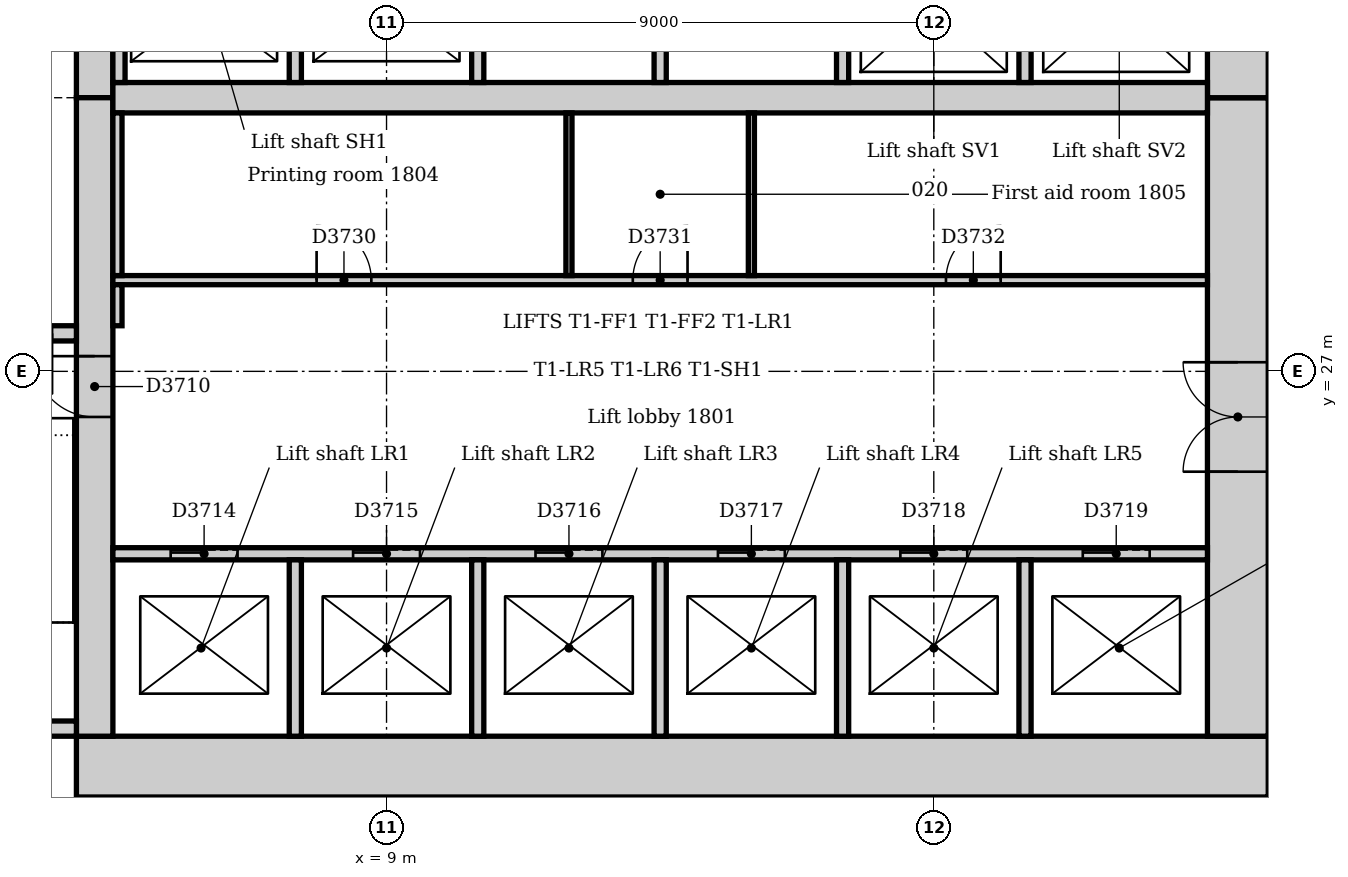
"""IFC4 building model, lengths in metres.
Left out: names, types, materials, properties, quantities, classifications, styles, units other than length and angle.
Written with IfcOpenShell. Run it as: python <this file> out.ifc"""

import sys

from ifc_helpers import new_model, si_unit, direction, frame, frame_2d, origin, place, context, subcontext, project, spatial, rectangle, extrude, element, fill, save


model = new_model("IFC4")
c1 = context("Model", 3, precision=1e-05, world=origin(), true_north=direction((0.0, 1.0)))
c2 = subcontext(c1, "Body", "Model", "MODEL_VIEW")
j1 = project(units=[si_unit("LENGTHUNIT", "METRE"), si_unit("PLANEANGLEUNIT", "RADIAN")], contexts=[c1])
p1 = place(None, origin())
s1 = spatial("IfcSite", under=j1, at=p1, CompositionType="ELEMENT")
p2 = place(p1, origin())
s2 = spatial("IfcBuilding", under=s1, at=p2, CompositionType="ELEMENT")
p3 = place(p2, frame((0.0, 0.0, 79.0)))
s3 = spatial("IfcBuildingStorey", under=s2, at=p3, CompositionType="ELEMENT", Elevation=79.0)
p4 = place(p3, frame((3.9, 20.5, 0.0), z_axis=(0.0, 0.0, 1.0), x_axis=(1.0, 0.0, 0.0)))
e1 = element("IfcWall", 1, at=p4, inside=s3, PredefinedType="SOLIDWALL", context=c2, shape_type="SweptSolid", body=[
    extrude(rectangle(XDim=19.6, YDim=1.0, at=frame_2d((9.8, 0.0))), origin(), (0.0, 0.0, 1.0), 4.0),
])
p5 = place(p3, frame((23.0, 21.0, 0.0), z_axis=(0.0, 0.0, 1.0), x_axis=(0.0, 1.0, 0.0)))
e2 = element("IfcWall", 2, at=p5, inside=s3, PredefinedType="SOLIDWALL", context=c2, shape_type="SweptSolid", body=[
    extrude(rectangle(XDim=10.5, YDim=1.0, at=frame_2d((5.25, 0.0))), origin(), (0.0, 0.0, 1.0), 4.0),
])
p6 = place(p5, frame((4.35, 0.0, 0.0)))
e3 = element("IfcOpeningElement", 3, at=p6, cuts=e2, PredefinedType="OPENING", context=c2, shape_type="SweptSolid", body=[
    extrude(rectangle(XDim=1.8, YDim=2.1, at=frame_2d((0.9, 1.05))), frame((0.0, 0.51, 0.0), z_axis=(0.0, -1.0, 0.0), x_axis=(1.0, 0.0, 0.0)), (0.0, 0.0, 1.0), 1.02),
])
p7 = place(p3, frame((23.0, 31.5, 0.0), z_axis=(0.0, 0.0, 1.0), x_axis=(0.0, 1.0, 0.0)))
e4 = element("IfcWall", 4, at=p7, inside=s3, PredefinedType="SOLIDWALL", context=c2, shape_type="SweptSolid", body=[
    extrude(rectangle(XDim=10.5, YDim=1.0, at=frame_2d((5.25, 0.0))), origin(), (0.0, 0.0, 1.0), 4.0),
])
p8 = place(p7, frame((3.15, 0.0, 0.0)))
e5 = element("IfcOpeningElement", 5, at=p8, cuts=e4, PredefinedType="OPENING", context=c2, shape_type="SweptSolid", body=[
    extrude(rectangle(XDim=1.0, YDim=2.1, at=frame_2d((0.5, 1.05))), frame((0.0, 0.51, 0.0), z_axis=(0.0, -1.0, 0.0), x_axis=(1.0, 0.0, 0.0)), (0.0, 0.0, 1.0), 1.02),
])
p9 = place(p7, frame((5.2, 0.0, 0.0)))
e6 = element("IfcOpeningElement", 6, at=p9, cuts=e4, PredefinedType="OPENING", context=c2, shape_type="SweptSolid", body=[
    extrude(rectangle(XDim=1.0, YDim=2.1, at=frame_2d((0.5, 1.05))), frame((0.0, 0.51, 0.0), z_axis=(0.0, -1.0, 0.0), x_axis=(1.0, 0.0, 0.0)), (0.0, 0.0, 1.0), 1.02),
])
p10 = place(p3, frame((4.2, 42.0, 0.0), z_axis=(0.0, 0.0, 1.0), x_axis=(0.0, -1.0, 0.0)))
e7 = element("IfcWall", 7, at=p10, inside=s3, PredefinedType="SOLIDWALL", context=c2, shape_type="SweptSolid", body=[
    extrude(rectangle(XDim=10.5, YDim=0.6, at=frame_2d((5.25, 0.0))), origin(), (0.0, 0.0, 1.0), 4.0),
])
p11 = place(p10, frame((5.3, 0.0, 0.0)))
e8 = element("IfcOpeningElement", 8, at=p11, cuts=e7, PredefinedType="OPENING", context=c2, shape_type="SweptSolid", body=[
    extrude(rectangle(XDim=1.0, YDim=2.1, at=frame_2d((0.5, 1.05))), frame((0.0, 0.31, 0.0), z_axis=(0.0, -1.0, 0.0), x_axis=(1.0, 0.0, 0.0)), (0.0, 0.0, 1.0), 0.62),
])
p12 = place(p3, frame((4.2, 31.5, 0.0), z_axis=(0.0, 0.0, 1.0), x_axis=(0.0, -1.0, 0.0)))
e9 = element("IfcWall", 9, at=p12, inside=s3, PredefinedType="SOLIDWALL", context=c2, shape_type="SweptSolid", body=[
    extrude(rectangle(XDim=10.5, YDim=0.6, at=frame_2d((5.25, 0.0))), origin(), (0.0, 0.0, 1.0), 4.0),
])
p13 = place(p12, frame((4.25, 0.0, 0.0)))
e10 = element("IfcOpeningElement", 10, at=p13, cuts=e9, PredefinedType="OPENING", context=c2, shape_type="SweptSolid", body=[
    extrude(rectangle(XDim=1.0, YDim=2.1, at=frame_2d((0.5, 1.05))), frame((0.0, 0.31, 0.0), z_axis=(0.0, -1.0, 0.0), x_axis=(1.0, 0.0, 0.0)), (0.0, 0.0, 1.0), 0.62),
])
p14 = place(p3, frame((4.5, 31.5, 0.0), z_axis=(0.0, 0.0, 1.0), x_axis=(1.0, 0.0, 0.0)))
e11 = element("IfcWall", 11, at=p14, inside=s3, PredefinedType="SOLIDWALL", context=c2, shape_type="SweptSolid", body=[
    extrude(rectangle(XDim=18.0, YDim=0.5, at=frame_2d((9.0, 0.0))), origin(), (0.0, 0.0, 1.0), 4.0),
])
p15 = place(p3, frame((0.36, 21.125, 0.0), z_axis=(0.0, 0.0, 1.0), x_axis=(1.0, 0.0, 0.0)))
e12 = element("IfcWall", 12, at=p15, inside=s3, PredefinedType="SOLIDWALL", context=c2, shape_type="SweptSolid", body=[
    extrude(rectangle(XDim=3.54, YDim=0.25, at=frame_2d((1.77, 0.0))), origin(), (0.0, 0.0, 1.0), 4.0),
])
p16 = place(p3, frame((3.9, 27.625, 0.0), z_axis=(0.0, 0.0, 1.0), x_axis=(-1.0, 0.0, 0.0)))
e13 = element("IfcWall", 13, at=p16, inside=s3, PredefinedType="SOLIDWALL", context=c2, shape_type="SweptSolid", body=[
    extrude(rectangle(XDim=3.54, YDim=0.25, at=frame_2d((1.77, 0.0))), origin(), (0.0, 0.0, 1.0), 4.0),
])
p17 = place(p16, frame((0.4, 0.0, 0.0)))
e14 = element("IfcOpeningElement", 14, at=p17, cuts=e13, PredefinedType="OPENING", context=c2, shape_type="SweptSolid", body=[
    extrude(rectangle(XDim=1.0, YDim=2.1, at=frame_2d((0.5, 1.05))), frame((0.0, 0.135, 0.0), z_axis=(0.0, -1.0, 0.0), x_axis=(1.0, 0.0, 0.0)), (0.0, 0.0, 1.0), 0.27),
])
p18 = place(p3, frame((4.5, 24.0, 0.0), z_axis=(0.0, 0.0, 1.0), x_axis=(1.0, 0.0, 0.0)))
e15 = element("IfcWall", 15, at=p18, inside=s3, PredefinedType="PARTITIONING", context=c2, shape_type="SweptSolid", body=[
    extrude(rectangle(XDim=18.0, YDim=0.2, at=frame_2d((9.0, 0.0))), origin(), (0.0, 0.0, 1.0), 3.85),
])
p19 = place(p18, frame((0.95, 0.0, 0.0)))
e16 = element("IfcOpeningElement", 16, at=p19, cuts=e15, PredefinedType="OPENING", context=c2, shape_type="SweptSolid", body=[
    extrude(rectangle(XDim=1.1, YDim=2.1, at=frame_2d((0.55, 1.05))), frame((0.0, 0.11, 0.0), z_axis=(0.0, -1.0, 0.0), x_axis=(1.0, 0.0, 0.0)), (0.0, 0.0, 1.0), 0.22),
])
p20 = place(p18, frame((3.95, 0.0, 0.0)))
e17 = element("IfcOpeningElement", 17, at=p20, cuts=e15, PredefinedType="OPENING", context=c2, shape_type="SweptSolid", body=[
    extrude(rectangle(XDim=1.1, YDim=2.1, at=frame_2d((0.55, 1.05))), frame((0.0, 0.11, 0.0), z_axis=(0.0, -1.0, 0.0), x_axis=(1.0, 0.0, 0.0)), (0.0, 0.0, 1.0), 0.22),
])
p21 = place(p18, frame((6.95, 0.0, 0.0)))
e18 = element("IfcOpeningElement", 18, at=p21, cuts=e15, PredefinedType="OPENING", context=c2, shape_type="SweptSolid", body=[
    extrude(rectangle(XDim=1.1, YDim=2.1, at=frame_2d((0.55, 1.05))), frame((0.0, 0.11, 0.0), z_axis=(0.0, -1.0, 0.0), x_axis=(1.0, 0.0, 0.0)), (0.0, 0.0, 1.0), 0.22),
])
p22 = place(p18, frame((9.95, 0.0, 0.0)))
e19 = element("IfcOpeningElement", 19, at=p22, cuts=e15, PredefinedType="OPENING", context=c2, shape_type="SweptSolid", body=[
    extrude(rectangle(XDim=1.1, YDim=2.1, at=frame_2d((0.55, 1.05))), frame((0.0, 0.11, 0.0), z_axis=(0.0, -1.0, 0.0), x_axis=(1.0, 0.0, 0.0)), (0.0, 0.0, 1.0), 0.22),
])
p23 = place(p18, frame((12.95, 0.0, 0.0)))
e20 = element("IfcOpeningElement", 20, at=p23, cuts=e15, PredefinedType="OPENING", context=c2, shape_type="SweptSolid", body=[
    extrude(rectangle(XDim=1.1, YDim=2.1, at=frame_2d((0.55, 1.05))), frame((0.0, 0.11, 0.0), z_axis=(0.0, -1.0, 0.0), x_axis=(1.0, 0.0, 0.0)), (0.0, 0.0, 1.0), 0.22),
])
p24 = place(p18, frame((15.95, 0.0, 0.0)))
e21 = element("IfcOpeningElement", 21, at=p24, cuts=e15, PredefinedType="OPENING", context=c2, shape_type="SweptSolid", body=[
    extrude(rectangle(XDim=1.1, YDim=2.1, at=frame_2d((0.55, 1.05))), frame((0.0, 0.11, 0.0), z_axis=(0.0, -1.0, 0.0), x_axis=(1.0, 0.0, 0.0)), (0.0, 0.0, 1.0), 0.22),
])
p25 = place(p3, frame((4.6, 31.75, 0.0), z_axis=(0.0, 0.0, 1.0), x_axis=(0.0, 1.0, 0.0)))
e22 = element("IfcWall", 22, at=p25, inside=s3, PredefinedType="PARTITIONING", context=c2, shape_type="SweptSolid", body=[
    extrude(rectangle(XDim=2.65, YDim=0.2, at=frame_2d((1.325, 0.0))), origin(), (0.0, 0.0, 1.0), 3.85),
])
p26 = place(p3, frame((7.5, 21.0, 0.0), z_axis=(0.0, 0.0, 1.0), x_axis=(0.0, 1.0, 0.0)))
e23 = element("IfcWall", 23, at=p26, inside=s3, PredefinedType="PARTITIONING", context=c2, shape_type="SweptSolid", body=[
    extrude(rectangle(XDim=2.9, YDim=0.2, at=frame_2d((1.45, 0.0))), origin(), (0.0, 0.0, 1.0), 3.85),
])
p27 = place(p3, frame((7.5, 31.75, 0.0), z_axis=(0.0, 0.0, 1.0), x_axis=(0.0, 1.0, 0.0)))
e24 = element("IfcWall", 24, at=p27, inside=s3, PredefinedType="PARTITIONING", context=c2, shape_type="SweptSolid", body=[
    extrude(rectangle(XDim=2.65, YDim=0.2, at=frame_2d((1.325, 0.0))), origin(), (0.0, 0.0, 1.0), 3.85),
])
p28 = place(p3, frame((10.5, 21.0, 0.0), z_axis=(0.0, 0.0, 1.0), x_axis=(0.0, 1.0, 0.0)))
e25 = element("IfcWall", 25, at=p28, inside=s3, PredefinedType="PARTITIONING", context=c2, shape_type="SweptSolid", body=[
    extrude(rectangle(XDim=2.9, YDim=0.2, at=frame_2d((1.45, 0.0))), origin(), (0.0, 0.0, 1.0), 3.85),
])
p29 = place(p3, frame((10.5, 31.75, 0.0), z_axis=(0.0, 0.0, 1.0), x_axis=(0.0, 1.0, 0.0)))
e26 = element("IfcWall", 26, at=p29, inside=s3, PredefinedType="PARTITIONING", context=c2, shape_type="SweptSolid", body=[
    extrude(rectangle(XDim=2.65, YDim=0.2, at=frame_2d((1.325, 0.0))), origin(), (0.0, 0.0, 1.0), 3.85),
])
p30 = place(p3, frame((13.5, 21.0, 0.0), z_axis=(0.0, 0.0, 1.0), x_axis=(0.0, 1.0, 0.0)))
e27 = element("IfcWall", 27, at=p30, inside=s3, PredefinedType="PARTITIONING", context=c2, shape_type="SweptSolid", body=[
    extrude(rectangle(XDim=2.9, YDim=0.2, at=frame_2d((1.45, 0.0))), origin(), (0.0, 0.0, 1.0), 3.85),
])
p31 = place(p3, frame((13.5, 31.75, 0.0), z_axis=(0.0, 0.0, 1.0), x_axis=(0.0, 1.0, 0.0)))
e28 = element("IfcWall", 28, at=p31, inside=s3, PredefinedType="PARTITIONING", context=c2, shape_type="SweptSolid", body=[
    extrude(rectangle(XDim=2.65, YDim=0.2, at=frame_2d((1.325, 0.0))), origin(), (0.0, 0.0, 1.0), 3.85),
])
p32 = place(p3, frame((16.5, 21.0, 0.0), z_axis=(0.0, 0.0, 1.0), x_axis=(0.0, 1.0, 0.0)))
e29 = element("IfcWall", 29, at=p32, inside=s3, PredefinedType="PARTITIONING", context=c2, shape_type="SweptSolid", body=[
    extrude(rectangle(XDim=2.9, YDim=0.2, at=frame_2d((1.45, 0.0))), origin(), (0.0, 0.0, 1.0), 3.85),
])
p33 = place(p3, frame((16.5, 31.75, 0.0), z_axis=(0.0, 0.0, 1.0), x_axis=(0.0, 1.0, 0.0)))
e30 = element("IfcWall", 30, at=p33, inside=s3, PredefinedType="PARTITIONING", context=c2, shape_type="SweptSolid", body=[
    extrude(rectangle(XDim=2.65, YDim=0.2, at=frame_2d((1.325, 0.0))), origin(), (0.0, 0.0, 1.0), 3.85),
])
p34 = place(p3, frame((19.5, 21.0, 0.0), z_axis=(0.0, 0.0, 1.0), x_axis=(0.0, 1.0, 0.0)))
e31 = element("IfcWall", 31, at=p34, inside=s3, PredefinedType="PARTITIONING", context=c2, shape_type="SweptSolid", body=[
    extrude(rectangle(XDim=2.9, YDim=0.2, at=frame_2d((1.45, 0.0))), origin(), (0.0, 0.0, 1.0), 3.85),
])
p35 = place(p3, frame((19.5, 31.75, 0.0), z_axis=(0.0, 0.0, 1.0), x_axis=(0.0, 1.0, 0.0)))
e32 = element("IfcWall", 32, at=p35, inside=s3, PredefinedType="PARTITIONING", context=c2, shape_type="SweptSolid", body=[
    extrude(rectangle(XDim=2.65, YDim=0.2, at=frame_2d((1.325, 0.0))), origin(), (0.0, 0.0, 1.0), 3.85),
])
p36 = place(p3, frame((4.5, 28.5, 0.0), z_axis=(0.0, 0.0, 1.0), x_axis=(1.0, 0.0, 0.0)))
e33 = element("IfcWall", 33, at=p36, inside=s3, PredefinedType="PARTITIONING", context=c2, shape_type="SweptSolid", body=[
    extrude(rectangle(XDim=18.0, YDim=0.15, at=frame_2d((9.0, 0.0))), origin(), (0.0, 0.0, 1.0), 3.85),
])
p37 = place(p36, frame((3.35, 0.0, 0.0)))
e34 = element("IfcOpeningElement", 34, at=p37, cuts=e33, PredefinedType="OPENING", context=c2, shape_type="SweptSolid", body=[
    extrude(rectangle(XDim=0.9, YDim=2.1, at=frame_2d((0.45, 1.05))), frame((0.0, 0.085, 0.0), z_axis=(0.0, -1.0, 0.0), x_axis=(1.0, 0.0, 0.0)), (0.0, 0.0, 1.0), 0.17),
])
p38 = place(p36, frame((8.55, 0.0, 0.0)))
e35 = element("IfcOpeningElement", 35, at=p38, cuts=e33, PredefinedType="OPENING", context=c2, shape_type="SweptSolid", body=[
    extrude(rectangle(XDim=0.9, YDim=2.1, at=frame_2d((0.45, 1.05))), frame((0.0, 0.085, 0.0), z_axis=(0.0, -1.0, 0.0), x_axis=(1.0, 0.0, 0.0)), (0.0, 0.0, 1.0), 0.17),
])
p39 = place(p36, frame((13.7, 0.0, 0.0)))
e36 = element("IfcOpeningElement", 36, at=p39, cuts=e33, PredefinedType="OPENING", context=c2, shape_type="SweptSolid", body=[
    extrude(rectangle(XDim=0.9, YDim=2.1, at=frame_2d((0.45, 1.05))), frame((0.0, 0.085, 0.0), z_axis=(0.0, -1.0, 0.0), x_axis=(1.0, 0.0, 0.0)), (0.0, 0.0, 1.0), 0.17),
])
p40 = place(p3, frame((4.575, 27.75, 0.0), z_axis=(0.0, 0.0, 1.0), x_axis=(0.0, 1.0, 0.0)))
e37 = element("IfcWall", 37, at=p40, inside=s3, PredefinedType="PARTITIONING", context=c2, shape_type="SweptSolid", body=[
    extrude(rectangle(XDim=0.675, YDim=0.15, at=frame_2d((0.338, 0.0))), origin(), (0.0, 0.0, 1.0), 3.85),
])
p41 = place(p3, frame((4.575, 28.575, 0.0), z_axis=(0.0, 0.0, 1.0), x_axis=(0.0, 1.0, 0.0)))
e38 = element("IfcWall", 38, at=p41, inside=s3, PredefinedType="PARTITIONING", context=c2, shape_type="SweptSolid", body=[
    extrude(rectangle(XDim=2.675, YDim=0.15, at=frame_2d((1.337, 0.0))), origin(), (0.0, 0.0, 1.0), 3.85),
])
for number, where, z_axis, x_axis in (
    (39, (12.0, 28.575, 0.0), (0.0, 0.0, 1.0), (0.0, 1.0, 0.0)),
    (40, (15.0, 28.575, 0.0), (0.0, 0.0, 1.0), (0.0, 1.0, 0.0)),
):
    element("IfcWall", number, at=place(p3, frame(where, z_axis=z_axis, x_axis=x_axis)), inside=s3, PredefinedType="PARTITIONING", context=c2, shape_type="SweptSolid", body=[
        extrude(rectangle(XDim=2.675, YDim=0.1, at=frame_2d((1.337, 0.0))), origin(), (0.0, 0.0, 1.0), 3.85),
    ])
p42 = place(p13, frame((1.0, 0.0, 0.0), z_axis=(0.0, 0.0, 1.0), x_axis=(-1.0, 0.0, 0.0)))
e41 = element("IfcDoor", 41, at=p42, inside=s3, OperationType="SINGLE_SWING_RIGHT", PredefinedType="DOOR", context=c2, shape_type="SweptSolid", body=[
    extrude(rectangle(XDim=1.0, YDim=2.1, at=frame_2d((0.5, 1.05))), frame((0.0, 0.025, 0.0), z_axis=(0.0, -1.0, 0.0), x_axis=(1.0, 0.0, 0.0)), (0.0, 0.0, 1.0), 0.05),
])
fill(e10, e41)
p43 = place(p19, origin())
e42 = element("IfcDoor", 42, at=p43, inside=s3, OperationType="SLIDING_TO_LEFT", PredefinedType="DOOR", context=c2, shape_type="SweptSolid", body=[
    extrude(rectangle(XDim=1.1, YDim=2.1, at=frame_2d((0.55, 1.05))), frame((0.0, 0.025, 0.0), z_axis=(0.0, -1.0, 0.0), x_axis=(1.0, 0.0, 0.0)), (0.0, 0.0, 1.0), 0.05),
])
fill(e16, e42)
p44 = place(p20, origin())
e43 = element("IfcDoor", 43, at=p44, inside=s3, OperationType="SLIDING_TO_LEFT", PredefinedType="DOOR", context=c2, shape_type="SweptSolid", body=[
    extrude(rectangle(XDim=1.1, YDim=2.1, at=frame_2d((0.55, 1.05))), frame((0.0, 0.025, 0.0), z_axis=(0.0, -1.0, 0.0), x_axis=(1.0, 0.0, 0.0)), (0.0, 0.0, 1.0), 0.05),
])
fill(e17, e43)
p45 = place(p21, origin())
e44 = element("IfcDoor", 44, at=p45, inside=s3, OperationType="SLIDING_TO_LEFT", PredefinedType="DOOR", context=c2, shape_type="SweptSolid", body=[
    extrude(rectangle(XDim=1.1, YDim=2.1, at=frame_2d((0.55, 1.05))), frame((0.0, 0.025, 0.0), z_axis=(0.0, -1.0, 0.0), x_axis=(1.0, 0.0, 0.0)), (0.0, 0.0, 1.0), 0.05),
])
fill(e18, e44)
p46 = place(p22, origin())
e45 = element("IfcDoor", 45, at=p46, inside=s3, OperationType="SLIDING_TO_LEFT", PredefinedType="DOOR", context=c2, shape_type="SweptSolid", body=[
    extrude(rectangle(XDim=1.1, YDim=2.1, at=frame_2d((0.55, 1.05))), frame((0.0, 0.025, 0.0), z_axis=(0.0, -1.0, 0.0), x_axis=(1.0, 0.0, 0.0)), (0.0, 0.0, 1.0), 0.05),
])
fill(e19, e45)
p47 = place(p23, origin())
e46 = element("IfcDoor", 46, at=p47, inside=s3, OperationType="SLIDING_TO_LEFT", PredefinedType="DOOR", context=c2, shape_type="SweptSolid", body=[
    extrude(rectangle(XDim=1.1, YDim=2.1, at=frame_2d((0.55, 1.05))), frame((0.0, 0.025, 0.0), z_axis=(0.0, -1.0, 0.0), x_axis=(1.0, 0.0, 0.0)), (0.0, 0.0, 1.0), 0.05),
])
fill(e20, e46)
p48 = place(p24, origin())
e47 = element("IfcDoor", 47, at=p48, inside=s3, OperationType="SLIDING_TO_LEFT", PredefinedType="DOOR", context=c2, shape_type="SweptSolid", body=[
    extrude(rectangle(XDim=1.1, YDim=2.1, at=frame_2d((0.55, 1.05))), frame((0.0, 0.025, 0.0), z_axis=(0.0, -1.0, 0.0), x_axis=(1.0, 0.0, 0.0)), (0.0, 0.0, 1.0), 0.05),
])
fill(e21, e47)
p49 = place(p6, origin())
e48 = element("IfcDoor", 48, at=p49, inside=s3, OperationType="DOUBLE_DOOR_DOUBLE_SWING", PredefinedType="DOOR", context=c2, shape_type="SweptSolid", body=[
    extrude(rectangle(XDim=1.8, YDim=2.1, at=frame_2d((0.9, 1.05))), frame((0.0, 0.025, 0.0), z_axis=(0.0, -1.0, 0.0), x_axis=(1.0, 0.0, 0.0)), (0.0, 0.0, 1.0), 0.05),
])
fill(e3, e48)
p50 = place(p37, origin())
e49 = element("IfcDoor", 49, at=p50, inside=s3, OperationType="SINGLE_SWING_LEFT", PredefinedType="DOOR", context=c2, shape_type="SweptSolid", body=[
    extrude(rectangle(XDim=0.9, YDim=2.1, at=frame_2d((0.45, 1.05))), frame((0.0, 0.025, 0.0), z_axis=(0.0, -1.0, 0.0), x_axis=(1.0, 0.0, 0.0)), (0.0, 0.0, 1.0), 0.05),
])
fill(e34, e49)
p51 = place(p38, origin())
e50 = element("IfcDoor", 50, at=p51, inside=s3, OperationType="SINGLE_SWING_RIGHT", PredefinedType="DOOR", context=c2, shape_type="SweptSolid", body=[
    extrude(rectangle(XDim=0.9, YDim=2.1, at=frame_2d((0.45, 1.05))), frame((0.0, 0.025, 0.0), z_axis=(0.0, -1.0, 0.0), x_axis=(1.0, 0.0, 0.0)), (0.0, 0.0, 1.0), 0.05),
])
fill(e35, e50)
p52 = place(p39, origin())
e51 = element("IfcDoor", 51, at=p52, inside=s3, OperationType="SINGLE_SWING_RIGHT", PredefinedType="DOOR", context=c2, shape_type="SweptSolid", body=[
    extrude(rectangle(XDim=0.9, YDim=2.1, at=frame_2d((0.45, 1.05))), frame((0.0, 0.025, 0.0), z_axis=(0.0, -1.0, 0.0), x_axis=(1.0, 0.0, 0.0)), (0.0, 0.0, 1.0), 0.05),
])
fill(e36, e51)
save(model, sys.argv[1])
